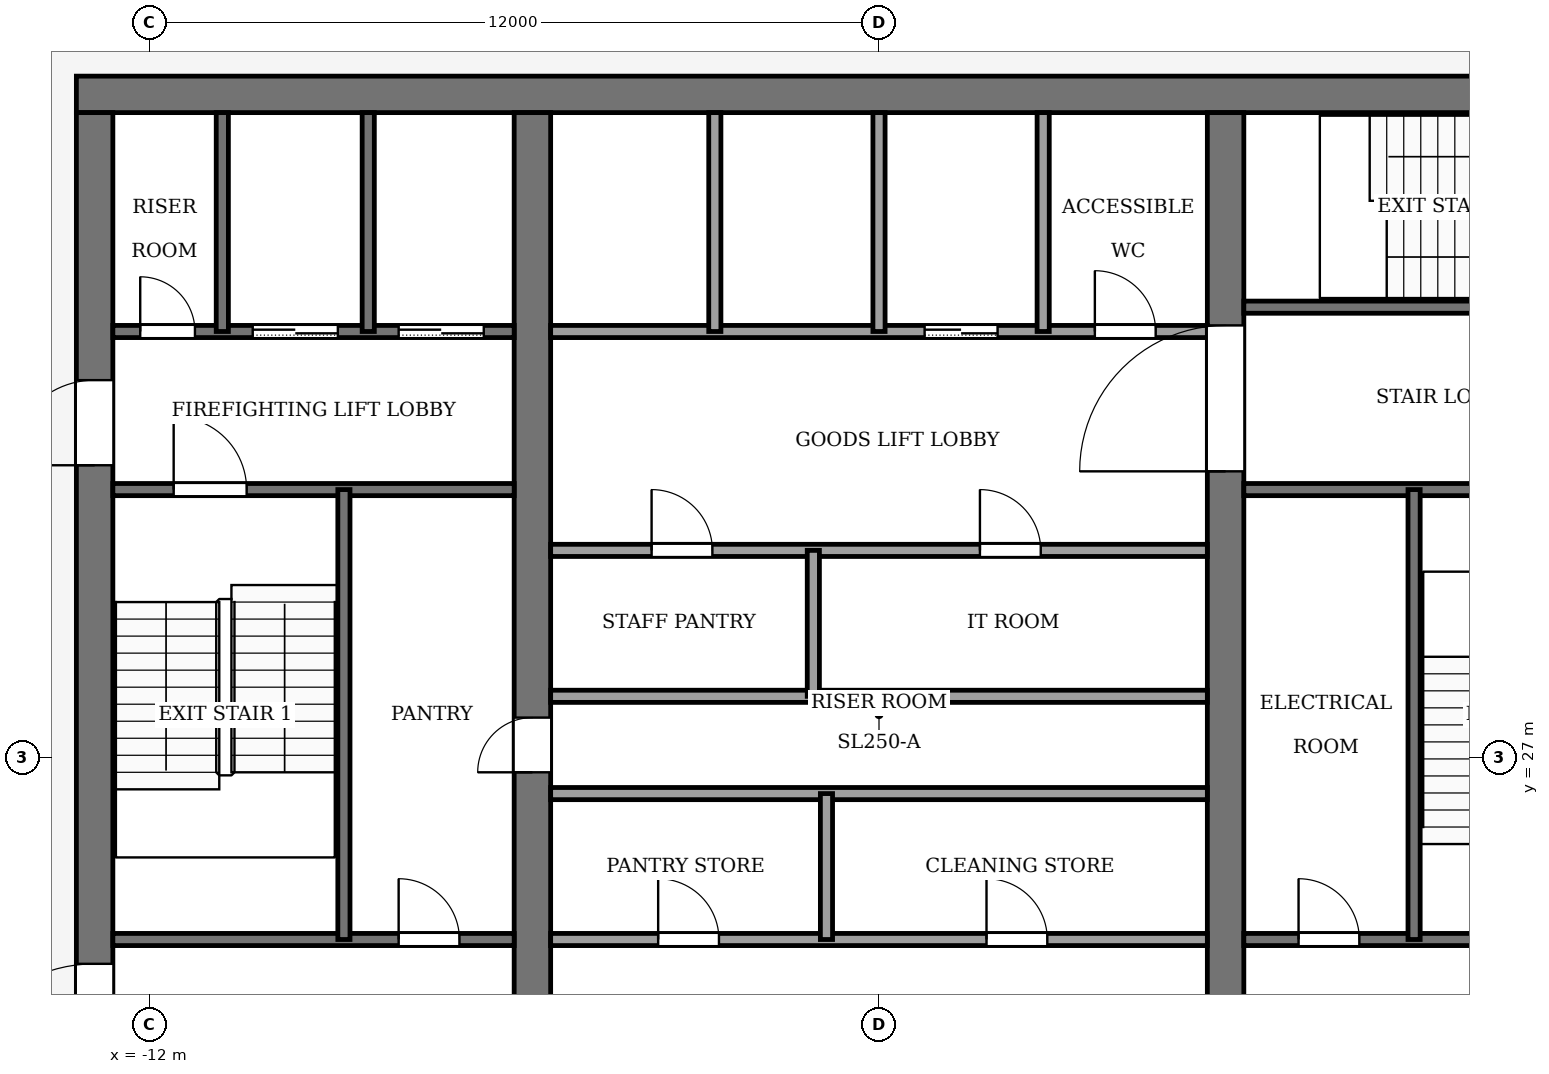
"""IFC4 building model, lengths in metres.
Left out: names, types, materials, properties, quantities, classifications, styles, units other than length and angle.
Written with IfcOpenShell. Run it as: python <this file> out.ifc"""

import sys

from ifc_helpers import new_model, si_unit, direction, frame, frame_2d, origin, place, context, subcontext, project, spatial, rectangle, extrude, element, fill, save


model = new_model("IFC4")
c1 = context("Model", 3, precision=1e-05, world=origin(), true_north=direction((0.0, 1.0)))
c2 = subcontext(c1, "Body", "Model", "MODEL_VIEW")
j1 = project(units=[si_unit("LENGTHUNIT", "METRE"), si_unit("PLANEANGLEUNIT", "RADIAN")], contexts=[c1])
p1 = place(None, origin())
s1 = spatial("IfcSite", under=j1, at=p1, CompositionType="ELEMENT")
p2 = place(p1, origin())
s2 = spatial("IfcBuilding", under=s1, at=p2, CompositionType="ELEMENT")
p3 = place(p2, frame((0.0, 0.0, 306.0)))
s3 = spatial("IfcBuildingStorey", under=s2, at=p3, CompositionType="ELEMENT", Elevation=306.0)
p4 = place(p3, frame((-13.2, 37.9, -0.13), z_axis=(0.0, 0.0, 1.0), x_axis=(1.0, 0.0, 0.0)))
e1 = element("IfcWall", 1, at=p4, inside=s3, PredefinedType="SHEAR", context=c2, shape_type="SweptSolid", body=[
    extrude(rectangle(XDim=26.4, YDim=0.6, at=frame_2d((13.2, 0.0))), origin(), (0.0, 0.0, 1.0), 4.0),
])
p5 = place(p3, frame((-12.9, 18.4, -0.13), z_axis=(0.0, 0.0, 1.0), x_axis=(0.0, 1.0, 0.0)))
e2 = element("IfcWall", 2, at=p5, inside=s3, PredefinedType="SHEAR", context=c2, shape_type="SweptSolid", body=[
    extrude(rectangle(XDim=19.2, YDim=0.6, at=frame_2d((9.6, 0.0))), origin(), (0.0, 0.0, 1.0), 4.0),
])
p6 = place(p5, frame((2.8, 0.0, 0.13)))
e3 = element("IfcOpeningElement", 3, at=p6, cuts=e2, PredefinedType="OPENING", context=c2, shape_type="SweptSolid", body=[
    extrude(rectangle(XDim=2.4, YDim=2.4, at=frame_2d((1.2, 1.2))), frame((0.0, 0.31, 0.0), z_axis=(0.0, -1.0, 0.0), x_axis=(1.0, 0.0, 0.0)), (0.0, 0.0, 1.0), 0.62),
])
p7 = place(p5, frame((13.4, 0.0, 0.13)))
e4 = element("IfcOpeningElement", 4, at=p7, cuts=e2, PredefinedType="OPENING", context=c2, shape_type="SweptSolid", body=[
    extrude(rectangle(XDim=1.4, YDim=2.2, at=frame_2d((0.7, 1.1))), frame((0.0, 0.31, 0.0), z_axis=(0.0, -1.0, 0.0), x_axis=(1.0, 0.0, 0.0)), (0.0, 0.0, 1.0), 0.62),
])
p8 = place(p3, frame((-5.7, 18.4, -0.13), z_axis=(0.0, 0.0, 1.0), x_axis=(0.0, 1.0, 0.0)))
e5 = element("IfcWall", 5, at=p8, inside=s3, PredefinedType="SHEAR", context=c2, shape_type="SweptSolid", body=[
    extrude(rectangle(XDim=19.2, YDim=0.6, at=frame_2d((9.6, 0.0))), origin(), (0.0, 0.0, 1.0), 4.0),
])
p9 = place(p8, frame((8.35, 0.0, 0.13)))
e6 = element("IfcOpeningElement", 6, at=p9, cuts=e5, PredefinedType="OPENING", context=c2, shape_type="SweptSolid", body=[
    extrude(rectangle(XDim=0.9, YDim=2.1, at=frame_2d((0.45, 1.05))), frame((0.0, 0.31, 0.0), z_axis=(0.0, -1.0, 0.0), x_axis=(1.0, 0.0, 0.0)), (0.0, 0.0, 1.0), 0.62),
])
p10 = place(p3, frame((5.7, 18.4, -0.13), z_axis=(0.0, 0.0, 1.0), x_axis=(0.0, 1.0, 0.0)))
e7 = element("IfcWall", 7, at=p10, inside=s3, PredefinedType="SHEAR", context=c2, shape_type="SweptSolid", body=[
    extrude(rectangle(XDim=19.2, YDim=0.6, at=frame_2d((9.6, 0.0))), origin(), (0.0, 0.0, 1.0), 4.0),
])
p11 = place(p10, frame((13.3, 0.0, 0.13)))
e8 = element("IfcOpeningElement", 8, at=p11, cuts=e7, PredefinedType="OPENING", context=c2, shape_type="SweptSolid", body=[
    extrude(rectangle(XDim=2.4, YDim=2.4, at=frame_2d((1.2, 1.2))), frame((0.0, 0.31, 0.0), z_axis=(0.0, -1.0, 0.0), x_axis=(1.0, 0.0, 0.0)), (0.0, 0.0, 1.0), 0.62),
])
p12 = place(p3, frame((-12.6, 24.0, 0.0), z_axis=(0.0, 0.0, 1.0), x_axis=(1.0, 0.0, 0.0)))
e9 = element("IfcWall", 9, at=p12, inside=s3, PredefinedType="PARTITIONING", context=c2, shape_type="SweptSolid", body=[
    extrude(rectangle(XDim=6.6, YDim=0.2, at=frame_2d((3.3, 0.0))), origin(), (0.0, 0.0, 1.0), 3.87),
])
p13 = place(p12, frame((4.7, 0.0, 0.0)))
e10 = element("IfcOpeningElement", 10, at=p13, cuts=e9, PredefinedType="OPENING", context=c2, shape_type="SweptSolid", body=[
    extrude(rectangle(XDim=1.0, YDim=2.1, at=frame_2d((0.5, 1.05))), frame((0.0, 0.11, 0.0), z_axis=(0.0, -1.0, 0.0), x_axis=(1.0, 0.0, 0.0)), (0.0, 0.0, 1.0), 0.22),
])
p14 = place(p3, frame((-5.4, 24.0, 0.0), z_axis=(0.0, 0.0, 1.0), x_axis=(1.0, 0.0, 0.0)))
e11 = element("IfcWall", 11, at=p14, inside=s3, PredefinedType="PARTITIONING", context=c2, shape_type="SweptSolid", body=[
    extrude(rectangle(XDim=10.8, YDim=0.2, at=frame_2d((5.4, 0.0))), origin(), (0.0, 0.0, 1.0), 3.87),
])
p15 = place(p14, frame((1.768, 0.0, 0.0)))
e12 = element("IfcOpeningElement", 12, at=p15, cuts=e11, PredefinedType="OPENING", context=c2, shape_type="SweptSolid", body=[
    extrude(rectangle(XDim=1.0, YDim=2.1, at=frame_2d((0.5, 1.05))), frame((0.0, 0.11, 0.0), z_axis=(0.0, -1.0, 0.0), x_axis=(1.0, 0.0, 0.0)), (0.0, 0.0, 1.0), 0.22),
])
p16 = place(p14, frame((7.168, 0.0, 0.0)))
e13 = element("IfcOpeningElement", 13, at=p16, cuts=e11, PredefinedType="OPENING", context=c2, shape_type="SweptSolid", body=[
    extrude(rectangle(XDim=1.0, YDim=2.1, at=frame_2d((0.5, 1.05))), frame((0.0, 0.11, 0.0), z_axis=(0.0, -1.0, 0.0), x_axis=(1.0, 0.0, 0.0)), (0.0, 0.0, 1.0), 0.22),
])
p17 = place(p3, frame((6.0, 24.0, 0.0), z_axis=(0.0, 0.0, 1.0), x_axis=(1.0, 0.0, 0.0)))
e14 = element("IfcWall", 14, at=p17, inside=s3, PredefinedType="PARTITIONING", context=c2, shape_type="SweptSolid", body=[
    extrude(rectangle(XDim=6.6, YDim=0.2, at=frame_2d((3.3, 0.0))), origin(), (0.0, 0.0, 1.0), 3.87),
])
p18 = place(p17, frame((0.9, 0.0, 0.0)))
e15 = element("IfcOpeningElement", 15, at=p18, cuts=e14, PredefinedType="OPENING", context=c2, shape_type="SweptSolid", body=[
    extrude(rectangle(XDim=1.0, YDim=2.1, at=frame_2d((0.5, 1.05))), frame((0.0, 0.11, 0.0), z_axis=(0.0, -1.0, 0.0), x_axis=(1.0, 0.0, 0.0)), (0.0, 0.0, 1.0), 0.22),
])
p19 = place(p17, frame((4.4, 0.0, 0.0)))
e16 = element("IfcOpeningElement", 16, at=p19, cuts=e14, PredefinedType="OPENING", context=c2, shape_type="SweptSolid", body=[
    extrude(rectangle(XDim=1.2, YDim=2.2, at=frame_2d((0.6, 1.1))), frame((0.0, 0.11, 0.0), z_axis=(0.0, -1.0, 0.0), x_axis=(1.0, 0.0, 0.0)), (0.0, 0.0, 1.0), 0.22),
])
for number, where, z_axis, x_axis in (
    (17, (-5.4, 26.4, 0.0), (0.0, 0.0, 1.0), (1.0, 0.0, 0.0)),
    (18, (-5.4, 28.0, 0.0), (0.0, 0.0, 1.0), (1.0, 0.0, 0.0)),
):
    element("IfcWall", number, at=place(p3, frame(where, z_axis=z_axis, x_axis=x_axis)), inside=s3, PredefinedType="PARTITIONING", context=c2, shape_type="SweptSolid", body=[
        extrude(rectangle(XDim=10.8, YDim=0.2, at=frame_2d((5.4, 0.0))), origin(), (0.0, 0.0, 1.0), 3.87),
    ])
p20 = place(p3, frame((-5.4, 30.4, 0.0), z_axis=(0.0, 0.0, 1.0), x_axis=(1.0, 0.0, 0.0)))
e19 = element("IfcWall", 19, at=p20, inside=s3, PredefinedType="PARTITIONING", context=c2, shape_type="SweptSolid", body=[
    extrude(rectangle(XDim=10.8, YDim=0.2, at=frame_2d((5.4, 0.0))), origin(), (0.0, 0.0, 1.0), 3.87),
])
p21 = place(p20, frame((1.66, 0.0, 0.0)))
e20 = element("IfcOpeningElement", 20, at=p21, cuts=e19, PredefinedType="OPENING", context=c2, shape_type="SweptSolid", body=[
    extrude(rectangle(XDim=1.0, YDim=2.1, at=frame_2d((0.5, 1.05))), frame((0.0, 0.11, 0.0), z_axis=(0.0, -1.0, 0.0), x_axis=(1.0, 0.0, 0.0)), (0.0, 0.0, 1.0), 0.22),
])
p22 = place(p20, frame((7.06, 0.0, 0.0)))
e21 = element("IfcOpeningElement", 21, at=p22, cuts=e19, PredefinedType="OPENING", context=c2, shape_type="SweptSolid", body=[
    extrude(rectangle(XDim=1.0, YDim=2.1, at=frame_2d((0.5, 1.05))), frame((0.0, 0.11, 0.0), z_axis=(0.0, -1.0, 0.0), x_axis=(1.0, 0.0, 0.0)), (0.0, 0.0, 1.0), 0.22),
])
p23 = place(p3, frame((-12.6, 31.4, 0.0), z_axis=(0.0, 0.0, 1.0), x_axis=(1.0, 0.0, 0.0)))
e22 = element("IfcWall", 22, at=p23, inside=s3, PredefinedType="PARTITIONING", context=c2, shape_type="SweptSolid", body=[
    extrude(rectangle(XDim=6.6, YDim=0.2, at=frame_2d((3.3, 0.0))), origin(), (0.0, 0.0, 1.0), 3.87),
])
p24 = place(p23, frame((1.0, 0.0, 0.0)))
e23 = element("IfcOpeningElement", 23, at=p24, cuts=e22, PredefinedType="OPENING", context=c2, shape_type="SweptSolid", body=[
    extrude(rectangle(XDim=1.2, YDim=2.2, at=frame_2d((0.6, 1.1))), frame((0.0, 0.11, 0.0), z_axis=(0.0, -1.0, 0.0), x_axis=(1.0, 0.0, 0.0)), (0.0, 0.0, 1.0), 0.22),
])
p25 = place(p3, frame((6.0, 31.4, 0.0), z_axis=(0.0, 0.0, 1.0), x_axis=(1.0, 0.0, 0.0)))
e24 = element("IfcWall", 24, at=p25, inside=s3, PredefinedType="PARTITIONING", context=c2, shape_type="SweptSolid", body=[
    extrude(rectangle(XDim=6.6, YDim=0.2, at=frame_2d((3.3, 0.0))), origin(), (0.0, 0.0, 1.0), 3.87),
])
p26 = place(p3, frame((-12.6, 34.0, 0.0), z_axis=(0.0, 0.0, 1.0), x_axis=(1.0, 0.0, 0.0)))
e25 = element("IfcWall", 25, at=p26, inside=s3, PredefinedType="PARTITIONING", context=c2, shape_type="SweptSolid", body=[
    extrude(rectangle(XDim=6.6, YDim=0.2, at=frame_2d((3.3, 0.0))), origin(), (0.0, 0.0, 1.0), 3.87),
])
p27 = place(p26, frame((4.7, 0.0, 0.0)))
e26 = element("IfcOpeningElement", 26, at=p27, cuts=e25, PredefinedType="OPENING", context=c2, shape_type="SweptSolid", body=[
    extrude(rectangle(XDim=1.4, YDim=2.2, at=frame_2d((0.7, 1.1))), frame((0.0, 0.11, 0.0), z_axis=(0.0, -1.0, 0.0), x_axis=(1.0, 0.0, 0.0)), (0.0, 0.0, 1.0), 0.22),
])
p28 = place(p26, frame((2.3, 0.0, 0.0)))
e27 = element("IfcOpeningElement", 27, at=p28, cuts=e25, PredefinedType="OPENING", context=c2, shape_type="SweptSolid", body=[
    extrude(rectangle(XDim=1.4, YDim=2.2, at=frame_2d((0.7, 1.1))), frame((0.0, 0.11, 0.0), z_axis=(0.0, -1.0, 0.0), x_axis=(1.0, 0.0, 0.0)), (0.0, 0.0, 1.0), 0.22),
])
p29 = place(p26, frame((0.45, 0.0, 0.0)))
e28 = element("IfcOpeningElement", 28, at=p29, cuts=e25, PredefinedType="OPENING", context=c2, shape_type="SweptSolid", body=[
    extrude(rectangle(XDim=0.9, YDim=2.1, at=frame_2d((0.45, 1.05))), frame((0.0, 0.11, 0.0), z_axis=(0.0, -1.0, 0.0), x_axis=(1.0, 0.0, 0.0)), (0.0, 0.0, 1.0), 0.22),
])
p30 = place(p3, frame((-5.4, 34.0, 0.0), z_axis=(0.0, 0.0, 1.0), x_axis=(1.0, 0.0, 0.0)))
e29 = element("IfcWall", 29, at=p30, inside=s3, PredefinedType="PARTITIONING", context=c2, shape_type="SweptSolid", body=[
    extrude(rectangle(XDim=10.8, YDim=0.2, at=frame_2d((5.4, 0.0))), origin(), (0.0, 0.0, 1.0), 3.87),
])
p31 = place(p30, frame((6.15, 0.0, 0.0)))
e30 = element("IfcOpeningElement", 30, at=p31, cuts=e29, PredefinedType="OPENING", context=c2, shape_type="SweptSolid", body=[
    extrude(rectangle(XDim=1.2, YDim=2.2, at=frame_2d((0.6, 1.1))), frame((0.0, 0.11, 0.0), z_axis=(0.0, -1.0, 0.0), x_axis=(1.0, 0.0, 0.0)), (0.0, 0.0, 1.0), 0.22),
])
p32 = place(p30, frame((8.95, 0.0, 0.0)))
e31 = element("IfcOpeningElement", 31, at=p32, cuts=e29, PredefinedType="OPENING", context=c2, shape_type="SweptSolid", body=[
    extrude(rectangle(XDim=1.0, YDim=2.1, at=frame_2d((0.5, 1.05))), frame((0.0, 0.11, 0.0), z_axis=(0.0, -1.0, 0.0), x_axis=(1.0, 0.0, 0.0)), (0.0, 0.0, 1.0), 0.22),
])
p33 = place(p3, frame((6.0, 34.4, 0.0), z_axis=(0.0, 0.0, 1.0), x_axis=(1.0, 0.0, 0.0)))
e32 = element("IfcWall", 32, at=p33, inside=s3, PredefinedType="PARTITIONING", context=c2, shape_type="SweptSolid", body=[
    extrude(rectangle(XDim=6.6, YDim=0.2, at=frame_2d((3.3, 0.0))), origin(), (0.0, 0.0, 1.0), 3.87),
])
p34 = place(p33, frame((4.8, 0.0, 0.0)))
e33 = element("IfcOpeningElement", 33, at=p34, cuts=e32, PredefinedType="OPENING", context=c2, shape_type="SweptSolid", body=[
    extrude(rectangle(XDim=1.2, YDim=2.2, at=frame_2d((0.6, 1.1))), frame((0.0, 0.11, 0.0), z_axis=(0.0, -1.0, 0.0), x_axis=(1.0, 0.0, 0.0)), (0.0, 0.0, 1.0), 0.22),
])
p35 = place(p3, frame((-10.8, 34.0, 0.0), z_axis=(0.0, 0.0, 1.0), x_axis=(0.0, 1.0, 0.0)))
e34 = element("IfcWall", 34, at=p35, inside=s3, PredefinedType="PARTITIONING", context=c2, shape_type="SweptSolid", body=[
    extrude(rectangle(XDim=3.6, YDim=0.2, at=frame_2d((1.8, 0.0))), origin(), (0.0, 0.0, 1.0), 3.87),
])
p36 = place(p3, frame((-8.8, 24.0, 0.0), z_axis=(0.0, 0.0, 1.0), x_axis=(0.0, 1.0, 0.0)))
e35 = element("IfcWall", 35, at=p36, inside=s3, PredefinedType="PARTITIONING", context=c2, shape_type="SweptSolid", body=[
    extrude(rectangle(XDim=7.4, YDim=0.2, at=frame_2d((3.7, 0.0))), origin(), (0.0, 0.0, 1.0), 3.87),
])
for number, where, z_axis, x_axis in (
    (36, (-8.4, 34.0, 0.0), (0.0, 0.0, 1.0), (0.0, 1.0, 0.0)),
    (37, (-2.7, 34.0, 0.0), (0.0, 0.0, 1.0), (0.0, 1.0, 0.0)),
):
    element("IfcWall", number, at=place(p3, frame(where, z_axis=z_axis, x_axis=x_axis)), inside=s3, PredefinedType="PARTITIONING", context=c2, shape_type="SweptSolid", body=[
        extrude(rectangle(XDim=3.6, YDim=0.2, at=frame_2d((1.8, 0.0))), origin(), (0.0, 0.0, 1.0), 3.87),
    ])
for number, where, z_axis, x_axis in (
    (38, (-1.08, 28.0, 0.0), (0.0, 0.0, 1.0), (0.0, 1.0, 0.0)),
    (39, (-0.864, 24.0, 0.0), (0.0, 0.0, 1.0), (0.0, 1.0, 0.0)),
):
    element("IfcWall", number, at=place(p3, frame(where, z_axis=z_axis, x_axis=x_axis)), inside=s3, PredefinedType="PARTITIONING", context=c2, shape_type="SweptSolid", body=[
        extrude(rectangle(XDim=2.4, YDim=0.2, at=frame_2d((1.2, 0.0))), origin(), (0.0, 0.0, 1.0), 3.87),
    ])
for number, where, z_axis, x_axis in (
    (40, (0.0, 34.0, 0.0), (0.0, 0.0, 1.0), (0.0, 1.0, 0.0)),
    (41, (2.7, 34.0, 0.0), (0.0, 0.0, 1.0), (0.0, 1.0, 0.0)),
):
    element("IfcWall", number, at=place(p3, frame(where, z_axis=z_axis, x_axis=x_axis)), inside=s3, PredefinedType="PARTITIONING", context=c2, shape_type="SweptSolid", body=[
        extrude(rectangle(XDim=3.6, YDim=0.2, at=frame_2d((1.8, 0.0))), origin(), (0.0, 0.0, 1.0), 3.87),
    ])
p37 = place(p3, frame((8.8, 24.0, 0.0), z_axis=(0.0, 0.0, 1.0), x_axis=(0.0, 1.0, 0.0)))
e42 = element("IfcWall", 42, at=p37, inside=s3, PredefinedType="PARTITIONING", context=c2, shape_type="SweptSolid", body=[
    extrude(rectangle(XDim=7.4, YDim=0.2, at=frame_2d((3.7, 0.0))), origin(), (0.0, 0.0, 1.0), 3.87),
])
p38 = place(p31, origin())
e43 = element("IfcDoor", 43, at=p38, inside=s3, OperationType="SLIDING_TO_LEFT", PredefinedType="DOOR", context=c2, shape_type="SweptSolid", body=[
    extrude(rectangle(XDim=1.2, YDim=2.2, at=frame_2d((0.6, 1.1))), frame((0.0, 0.025, 0.0), z_axis=(0.0, -1.0, 0.0), x_axis=(1.0, 0.0, 0.0)), (0.0, 0.0, 1.0), 0.05),
])
fill(e30, e43)
p39 = place(p27, origin())
e44 = element("IfcDoor", 44, at=p39, inside=s3, OperationType="SLIDING_TO_LEFT", PredefinedType="DOOR", context=c2, shape_type="SweptSolid", body=[
    extrude(rectangle(XDim=1.4, YDim=2.2, at=frame_2d((0.7, 1.1))), frame((0.0, 0.025, 0.0), z_axis=(0.0, -1.0, 0.0), x_axis=(1.0, 0.0, 0.0)), (0.0, 0.0, 1.0), 0.05),
])
fill(e26, e44)
p40 = place(p28, origin())
e45 = element("IfcDoor", 45, at=p40, inside=s3, OperationType="SLIDING_TO_LEFT", PredefinedType="DOOR", context=c2, shape_type="SweptSolid", body=[
    extrude(rectangle(XDim=1.4, YDim=2.2, at=frame_2d((0.7, 1.1))), frame((0.0, 0.025, 0.0), z_axis=(0.0, -1.0, 0.0), x_axis=(1.0, 0.0, 0.0)), (0.0, 0.0, 1.0), 0.05),
])
fill(e27, e45)
p41 = place(p29, origin())
e46 = element("IfcDoor", 46, at=p41, inside=s3, OperationType="SINGLE_SWING_RIGHT", PredefinedType="DOOR", context=c2, shape_type="SweptSolid", body=[
    extrude(rectangle(XDim=0.9, YDim=2.1, at=frame_2d((0.45, 1.05))), frame((0.0, 0.025, 0.0), z_axis=(0.0, -1.0, 0.0), x_axis=(1.0, 0.0, 0.0)), (0.0, 0.0, 1.0), 0.05),
])
fill(e28, e46)
p42 = place(p15, origin())
e47 = element("IfcDoor", 47, at=p42, inside=s3, OperationType="SINGLE_SWING_LEFT", PredefinedType="DOOR", context=c2, shape_type="SweptSolid", body=[
    extrude(rectangle(XDim=1.0, YDim=2.1, at=frame_2d((0.5, 1.05))), frame((0.0, 0.025, 0.0), z_axis=(0.0, -1.0, 0.0), x_axis=(1.0, 0.0, 0.0)), (0.0, 0.0, 1.0), 0.05),
])
fill(e12, e47)
p43 = place(p16, origin())
e48 = element("IfcDoor", 48, at=p43, inside=s3, OperationType="SINGLE_SWING_RIGHT", PredefinedType="DOOR", context=c2, shape_type="SweptSolid", body=[
    extrude(rectangle(XDim=1.0, YDim=2.1, at=frame_2d((0.5, 1.05))), frame((0.0, 0.025, 0.0), z_axis=(0.0, -1.0, 0.0), x_axis=(1.0, 0.0, 0.0)), (0.0, 0.0, 1.0), 0.05),
])
fill(e13, e48)
p44 = place(p21, origin())
e49 = element("IfcDoor", 49, at=p44, inside=s3, OperationType="SINGLE_SWING_RIGHT", PredefinedType="DOOR", context=c2, shape_type="SweptSolid", body=[
    extrude(rectangle(XDim=1.0, YDim=2.1, at=frame_2d((0.5, 1.05))), frame((0.0, 0.025, 0.0), z_axis=(0.0, -1.0, 0.0), x_axis=(1.0, 0.0, 0.0)), (0.0, 0.0, 1.0), 0.05),
])
fill(e20, e49)
p45 = place(p22, origin())
e50 = element("IfcDoor", 50, at=p45, inside=s3, OperationType="SINGLE_SWING_LEFT", PredefinedType="DOOR", context=c2, shape_type="SweptSolid", body=[
    extrude(rectangle(XDim=1.0, YDim=2.1, at=frame_2d((0.5, 1.05))), frame((0.0, 0.025, 0.0), z_axis=(0.0, -1.0, 0.0), x_axis=(1.0, 0.0, 0.0)), (0.0, 0.0, 1.0), 0.05),
])
fill(e21, e50)
p46 = place(p13, origin())
e51 = element("IfcDoor", 51, at=p46, inside=s3, OperationType="SINGLE_SWING_RIGHT", PredefinedType="DOOR", context=c2, shape_type="SweptSolid", body=[
    extrude(rectangle(XDim=1.0, YDim=2.1, at=frame_2d((0.5, 1.05))), frame((0.0, 0.025, 0.0), z_axis=(0.0, -1.0, 0.0), x_axis=(1.0, 0.0, 0.0)), (0.0, 0.0, 1.0), 0.05),
])
fill(e10, e51)
p47 = place(p18, origin())
e52 = element("IfcDoor", 52, at=p47, inside=s3, OperationType="SINGLE_SWING_LEFT", PredefinedType="DOOR", context=c2, shape_type="SweptSolid", body=[
    extrude(rectangle(XDim=1.0, YDim=2.1, at=frame_2d((0.5, 1.05))), frame((0.0, 0.025, 0.0), z_axis=(0.0, -1.0, 0.0), x_axis=(1.0, 0.0, 0.0)), (0.0, 0.0, 1.0), 0.05),
])
fill(e15, e52)
p48 = place(p32, origin())
e53 = element("IfcDoor", 53, at=p48, inside=s3, OperationType="SINGLE_SWING_LEFT", PredefinedType="DOOR", context=c2, shape_type="SweptSolid", body=[
    extrude(rectangle(XDim=1.0, YDim=2.1, at=frame_2d((0.5, 1.05))), frame((0.0, 0.025, 0.0), z_axis=(0.0, -1.0, 0.0), x_axis=(1.0, 0.0, 0.0)), (0.0, 0.0, 1.0), 0.05),
])
fill(e31, e53)
p49 = place(p9, origin())
e54 = element("IfcDoor", 54, at=p49, inside=s3, OperationType="SINGLE_SWING_RIGHT", PredefinedType="DOOR", context=c2, shape_type="SweptSolid", body=[
    extrude(rectangle(XDim=0.9, YDim=2.1, at=frame_2d((0.45, 1.05))), frame((0.0, 0.025, 0.0), z_axis=(0.0, -1.0, 0.0), x_axis=(1.0, 0.0, 0.0)), (0.0, 0.0, 1.0), 0.05),
])
fill(e6, e54)
p50 = place(p24, origin())
e55 = element("IfcDoor", 55, at=p50, inside=s3, OperationType="SINGLE_SWING_RIGHT", PredefinedType="DOOR", context=c2, shape_type="SweptSolid", body=[
    extrude(rectangle(XDim=1.2, YDim=2.2, at=frame_2d((0.6, 1.1))), frame((0.0, 0.025, 0.0), z_axis=(0.0, -1.0, 0.0), x_axis=(1.0, 0.0, 0.0)), (0.0, 0.0, 1.0), 0.05),
])
fill(e23, e55)
p51 = place(p11, origin())
e56 = element("IfcDoor", 56, at=p51, inside=s3, OperationType="DOUBLE_DOOR_SINGLE_SWING", PredefinedType="DOOR", context=c2, shape_type="SweptSolid", body=[
    extrude(rectangle(XDim=2.4, YDim=2.4, at=frame_2d((1.2, 1.2))), frame((0.0, 0.025, 0.0), z_axis=(0.0, -1.0, 0.0), x_axis=(1.0, 0.0, 0.0)), (0.0, 0.0, 1.0), 0.05),
])
fill(e8, e56)
p52 = place(p6, origin())
e57 = element("IfcDoor", 57, at=p52, inside=s3, OperationType="DOUBLE_DOOR_SINGLE_SWING", PredefinedType="DOOR", context=c2, shape_type="SweptSolid", body=[
    extrude(rectangle(XDim=2.4, YDim=2.4, at=frame_2d((1.2, 1.2))), frame((0.0, 0.025, 0.0), z_axis=(0.0, -1.0, 0.0), x_axis=(1.0, 0.0, 0.0)), (0.0, 0.0, 1.0), 0.05),
])
fill(e3, e57)
p53 = place(p7, origin())
e58 = element("IfcDoor", 58, at=p53, inside=s3, OperationType="SINGLE_SWING_RIGHT", PredefinedType="DOOR", context=c2, shape_type="SweptSolid", body=[
    extrude(rectangle(XDim=1.4, YDim=2.2, at=frame_2d((0.7, 1.1))), frame((0.0, 0.025, 0.0), z_axis=(0.0, -1.0, 0.0), x_axis=(1.0, 0.0, 0.0)), (0.0, 0.0, 1.0), 0.05),
])
fill(e4, e58)
save(model, sys.argv[1])
